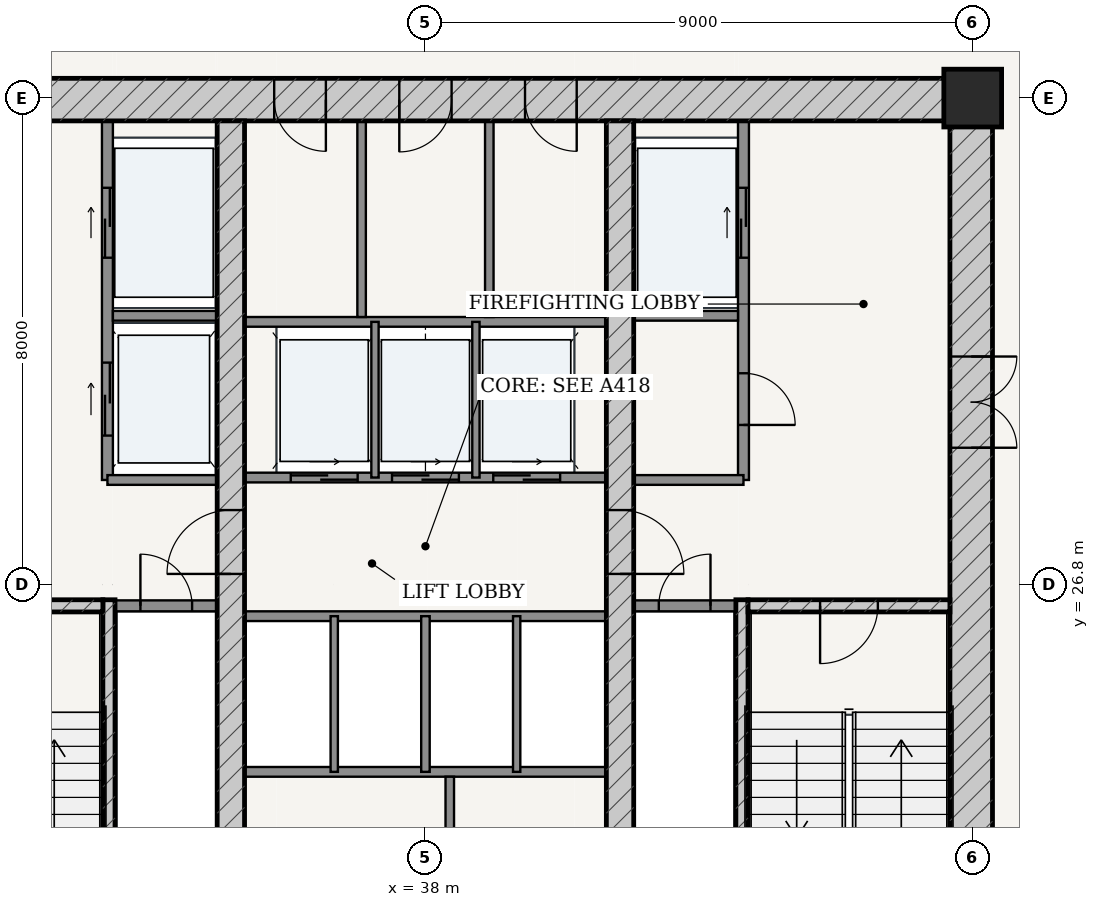
"""IFC4 building model, lengths in metres.
Left out: names, types, materials, properties, quantities, classifications, styles, units other than length and angle.
Written with IfcOpenShell. Run it as: python <this file> out.ifc"""

import sys

from ifc_helpers import new_model, si_unit, direction, frame, frame_2d, origin, origin_2d, place, context, subcontext, project, spatial, rectangle, extrude, source, transform, mapped, element, fill, save


model = new_model("IFC4")
c1 = context("Model", 3, precision=1e-05, world=origin(), true_north=direction((-0.2419218956, 0.970295726276)))
c2 = subcontext(c1, "Body", "Model", "MODEL_VIEW")
j1 = project(units=[si_unit("LENGTHUNIT", "METRE"), si_unit("PLANEANGLEUNIT", "RADIAN")], contexts=[c1])
p1 = place(None, origin())
s1 = spatial("IfcSite", under=j1, at=p1, CompositionType="ELEMENT")
p2 = place(p1, origin())
s2 = spatial("IfcBuilding", under=s1, at=p2, CompositionType="ELEMENT")
p3 = place(p2, frame((0.0, 0.0, 119.4)))
s3 = spatial("IfcBuildingStorey", under=s2, at=p3, CompositionType="ELEMENT", Elevation=119.4)
p4 = place(p3, frame((47.0, 34.8, 0.0), z_axis=(0.0, 0.0, 1.0), x_axis=(1.0, 0.0, 0.0)))
e1 = element("IfcColumn", 1, at=p4, inside=s3, PredefinedType="COLUMN", context=c2, shape_type="SweptSolid", body=[
    extrude(rectangle(XDim=0.95, YDim=0.95, at=origin_2d()), origin(), (0.0, 0.0, 1.0), 3.6),
])
p5 = place(p3, frame((28.675, 34.775, 0.0), z_axis=(0.0, 0.0, 1.0), x_axis=(1.0, 0.0, 0.0)))
e2 = element("IfcWall", 2, at=p5, inside=s3, PredefinedType="SHEAR", context=c2, shape_type="SweptSolid", body=[
    extrude(rectangle(XDim=18.65, YDim=0.7, at=frame_2d((9.325, 0.0))), origin(), (0.0, 0.0, 1.0), 3.325),
])
p6 = place(p5, frame((6.837, 0.0, 0.0)))
e3 = element("IfcOpeningElement", 3, at=p6, cuts=e2, PredefinedType="OPENING", context=c2, shape_type="SweptSolid", body=[
    extrude(rectangle(XDim=0.85, YDim=2.1, at=frame_2d((0.425, 1.05))), frame((0.0, 0.36, 0.0), z_axis=(0.0, -1.0, 0.0), x_axis=(1.0, 0.0, 0.0)), (0.0, 0.0, 1.0), 0.72),
])
p7 = place(p5, frame((8.895, 0.0, 0.0)))
e4 = element("IfcOpeningElement", 4, at=p7, cuts=e2, PredefinedType="OPENING", context=c2, shape_type="SweptSolid", body=[
    extrude(rectangle(XDim=0.86, YDim=2.1, at=frame_2d((0.43, 1.05))), frame((0.0, 0.36, 0.0), z_axis=(0.0, -1.0, 0.0), x_axis=(1.0, 0.0, 0.0)), (0.0, 0.0, 1.0), 0.72),
])
p8 = place(p5, frame((10.962, 0.0, 0.0)))
e5 = element("IfcOpeningElement", 5, at=p8, cuts=e2, PredefinedType="OPENING", context=c2, shape_type="SweptSolid", body=[
    extrude(rectangle(XDim=0.85, YDim=2.1, at=frame_2d((0.425, 1.05))), frame((0.0, 0.36, 0.0), z_axis=(0.0, -1.0, 0.0), x_axis=(1.0, 0.0, 0.0)), (0.0, 0.0, 1.0), 0.72),
])
p9 = place(p3, frame((46.975, 19.175, 0.0), z_axis=(0.0, 0.0, 1.0), x_axis=(0.0, 1.0, 0.0)))
e6 = element("IfcWall", 6, at=p9, inside=s3, PredefinedType="SHEAR", context=c2, shape_type="SweptSolid", body=[
    extrude(rectangle(XDim=15.25, YDim=0.7, at=frame_2d((7.625, 0.0))), origin(), (0.0, 0.0, 1.0), 3.325),
])
p10 = place(p9, frame((9.875, 0.0, 0.0)))
e7 = element("IfcOpeningElement", 7, at=p10, cuts=e6, PredefinedType="OPENING", context=c2, shape_type="SweptSolid", body=[
    extrude(rectangle(XDim=1.5, YDim=2.2, at=frame_2d((0.75, 1.1))), frame((0.0, 0.36, 0.0), z_axis=(0.0, -1.0, 0.0), x_axis=(1.0, 0.0, 0.0)), (0.0, 0.0, 1.0), 0.72),
])
p11 = place(p3, frame((32.795, 19.175, 0.0), z_axis=(0.0, 0.0, 1.0), x_axis=(0.0, 1.0, 0.0)))
e8 = element("IfcWall", 8, at=p11, inside=s3, PredefinedType="SOLIDWALL", context=c2, shape_type="SweptSolid", body=[
    extrude(rectangle(XDim=7.375, YDim=0.2, at=frame_2d((3.688, 0.0))), origin(), (0.0, 0.0, 1.0), 3.325),
])
p12 = place(p3, frame((29.375, 26.45, 0.0), z_axis=(0.0, 0.0, 1.0), x_axis=(1.0, 0.0, 0.0)))
e9 = element("IfcWall", 9, at=p12, inside=s3, PredefinedType="SOLIDWALL", context=c2, shape_type="SweptSolid", body=[
    extrude(rectangle(XDim=3.32, YDim=0.2, at=frame_2d((1.66, 0.0))), origin(), (0.0, 0.0, 1.0), 3.325),
])
p13 = place(p12, frame((1.185, 0.0, 0.0)))
e10 = element("IfcOpeningElement", 10, at=p13, cuts=e9, PredefinedType="OPENING", context=c2, shape_type="SweptSolid", body=[
    extrude(rectangle(XDim=0.95, YDim=2.15, at=frame_2d((0.475, 1.075))), frame((0.0, 0.11, 0.0), z_axis=(0.0, -1.0, 0.0), x_axis=(1.0, 0.0, 0.0)), (0.0, 0.0, 1.0), 0.22),
])
p14 = place(p3, frame((43.205, 19.175, 0.0), z_axis=(0.0, 0.0, 1.0), x_axis=(0.0, 1.0, 0.0)))
e11 = element("IfcWall", 11, at=p14, inside=s3, PredefinedType="SOLIDWALL", context=c2, shape_type="SweptSolid", body=[
    extrude(rectangle(XDim=7.375, YDim=0.2, at=frame_2d((3.688, 0.0))), origin(), (0.0, 0.0, 1.0), 3.325),
])
p15 = place(p3, frame((43.305, 26.45, 0.0), z_axis=(0.0, 0.0, 1.0), x_axis=(1.0, 0.0, 0.0)))
e12 = element("IfcWall", 12, at=p15, inside=s3, PredefinedType="SOLIDWALL", context=c2, shape_type="SweptSolid", body=[
    extrude(rectangle(XDim=3.32, YDim=0.2, at=frame_2d((1.66, 0.0))), origin(), (0.0, 0.0, 1.0), 3.325),
])
p16 = place(p15, frame((1.185, 0.0, 0.0)))
e13 = element("IfcOpeningElement", 13, at=p16, cuts=e12, PredefinedType="OPENING", context=c2, shape_type="SweptSolid", body=[
    extrude(rectangle(XDim=0.95, YDim=2.15, at=frame_2d((0.475, 1.075))), frame((0.0, 0.11, 0.0), z_axis=(0.0, -1.0, 0.0), x_axis=(1.0, 0.0, 0.0)), (0.0, 0.0, 1.0), 0.22),
])
p17 = place(p3, frame((34.8, 19.175, 0.0), z_axis=(0.0, 0.0, 1.0), x_axis=(0.0, 1.0, 0.0)))
e14 = element("IfcWall", 14, at=p17, inside=s3, PredefinedType="SHEAR", context=c2, shape_type="SweptSolid", body=[
    extrude(rectangle(XDim=15.25, YDim=0.45, at=frame_2d((7.625, 0.0))), origin(), (0.0, 0.0, 1.0), 3.325),
])
p18 = place(p17, frame((7.8, 0.0, 0.0)))
e15 = element("IfcOpeningElement", 15, at=p18, cuts=e14, PredefinedType="OPENING", context=c2, shape_type="SweptSolid", body=[
    extrude(rectangle(XDim=1.05, YDim=2.15, at=frame_2d((0.525, 1.075))), frame((0.0, 0.235, 0.0), z_axis=(0.0, -1.0, 0.0), x_axis=(1.0, 0.0, 0.0)), (0.0, 0.0, 1.0), 0.47),
])
p19 = place(p3, frame((41.2, 19.175, 0.0), z_axis=(0.0, 0.0, 1.0), x_axis=(0.0, 1.0, 0.0)))
e16 = element("IfcWall", 16, at=p19, inside=s3, PredefinedType="SHEAR", context=c2, shape_type="SweptSolid", body=[
    extrude(rectangle(XDim=15.25, YDim=0.45, at=frame_2d((7.625, 0.0))), origin(), (0.0, 0.0, 1.0), 3.325),
])
p20 = place(p19, frame((7.8, 0.0, 0.0)))
e17 = element("IfcOpeningElement", 17, at=p20, cuts=e16, PredefinedType="OPENING", context=c2, shape_type="SweptSolid", body=[
    extrude(rectangle(XDim=1.05, YDim=2.15, at=frame_2d((0.525, 1.075))), frame((0.0, 0.235, 0.0), z_axis=(0.0, -1.0, 0.0), x_axis=(1.0, 0.0, 0.0)), (0.0, 0.0, 1.0), 0.47),
])
p21 = place(p3, frame((32.9, 26.45, 0.0), z_axis=(0.0, 0.0, 1.0), x_axis=(1.0, 0.0, 0.0)))
e18 = element("IfcWall", 18, at=p21, inside=s3, PredefinedType="PARTITIONING", context=c2, shape_type="SweptSolid", body=[
    extrude(rectangle(XDim=1.675, YDim=0.18, at=frame_2d((0.837, 0.0))), origin(), (0.0, 0.0, 1.0), 3.325),
])
p22 = place(p21, frame((0.413, 0.0, 0.0)))
e19 = element("IfcOpeningElement", 19, at=p22, cuts=e18, PredefinedType="OPENING", context=c2, shape_type="SweptSolid", body=[
    extrude(rectangle(XDim=0.85, YDim=2.1, at=frame_2d((0.425, 1.05))), frame((0.0, 0.1, 0.0), z_axis=(0.0, -1.0, 0.0), x_axis=(1.0, 0.0, 0.0)), (0.0, 0.0, 1.0), 0.2),
])
p23 = place(p3, frame((41.425, 26.45, 0.0), z_axis=(0.0, 0.0, 1.0), x_axis=(1.0, 0.0, 0.0)))
e20 = element("IfcWall", 20, at=p23, inside=s3, PredefinedType="PARTITIONING", context=c2, shape_type="SweptSolid", body=[
    extrude(rectangle(XDim=1.675, YDim=0.18, at=frame_2d((0.837, 0.0))), origin(), (0.0, 0.0, 1.0), 3.325),
])
p24 = place(p23, frame((0.413, 0.0, 0.0)))
e21 = element("IfcOpeningElement", 21, at=p24, cuts=e20, PredefinedType="OPENING", context=c2, shape_type="SweptSolid", body=[
    extrude(rectangle(XDim=0.85, YDim=2.1, at=frame_2d((0.425, 1.05))), frame((0.0, 0.1, 0.0), z_axis=(0.0, -1.0, 0.0), x_axis=(1.0, 0.0, 0.0)), (0.0, 0.0, 1.0), 0.2),
])
p25 = place(p3, frame((32.77, 28.52, 0.0), z_axis=(0.0, 0.0, 1.0), x_axis=(0.0, 1.0, 0.0)))
e22 = element("IfcWall", 22, at=p25, inside=s3, PredefinedType="PARTITIONING", context=c2, shape_type="SweptSolid", body=[
    extrude(rectangle(XDim=5.905, YDim=0.18, at=frame_2d((2.953, 0.0))), origin(), (0.0, 0.0, 1.0), 3.325),
])
p26 = place(p25, frame((3.655, 0.0, 0.0)))
e23 = element("IfcOpeningElement", 23, at=p26, cuts=e22, PredefinedType="OPENING", context=c2, shape_type="SweptSolid", body=[
    extrude(rectangle(XDim=1.15, YDim=2.2, at=frame_2d((0.575, 1.1))), frame((0.0, 0.1, 0.0), z_axis=(0.0, -1.0, 0.0), x_axis=(1.0, 0.0, 0.0)), (0.0, 0.0, 1.0), 0.2),
])
p27 = place(p25, frame((0.73, 0.0, 0.0)))
e24 = element("IfcOpeningElement", 24, at=p27, cuts=e22, PredefinedType="OPENING", context=c2, shape_type="SweptSolid", body=[
    extrude(rectangle(XDim=1.2, YDim=2.25, at=frame_2d((0.6, 1.125))), frame((0.0, 0.1, 0.0), z_axis=(0.0, -1.0, 0.0), x_axis=(1.0, 0.0, 0.0)), (0.0, 0.0, 1.0), 0.2),
])
p28 = place(p3, frame((32.86, 31.22, 0.0), z_axis=(0.0, 0.0, 1.0), x_axis=(1.0, 0.0, 0.0)))
e25 = element("IfcWall", 25, at=p28, inside=s3, PredefinedType="PARTITIONING", context=c2, shape_type="SweptSolid", body=[
    extrude(rectangle(XDim=1.715, YDim=0.16, at=frame_2d((0.857, 0.0))), origin(), (0.0, 0.0, 1.0), 3.325),
])
p29 = place(p3, frame((32.77, 28.52, 0.0), z_axis=(0.0, 0.0, 1.0), x_axis=(1.0, 0.0, 0.0)))
e26 = element("IfcWall", 26, at=p29, inside=s3, PredefinedType="PARTITIONING", context=c2, shape_type="SweptSolid", body=[
    extrude(rectangle(XDim=1.805, YDim=0.16, at=frame_2d((0.902, 0.0))), origin(), (0.0, 0.0, 1.0), 3.325),
])
p30 = place(p3, frame((43.23, 28.52, 0.0), z_axis=(0.0, 0.0, 1.0), x_axis=(0.0, 1.0, 0.0)))
e27 = element("IfcWall", 27, at=p30, inside=s3, PredefinedType="PARTITIONING", context=c2, shape_type="SweptSolid", body=[
    extrude(rectangle(XDim=5.905, YDim=0.18, at=frame_2d((2.953, 0.0))), origin(), (0.0, 0.0, 1.0), 3.325),
])
p31 = place(p30, frame((0.905, 0.0, 0.0)))
e28 = element("IfcOpeningElement", 28, at=p31, cuts=e27, PredefinedType="OPENING", context=c2, shape_type="SweptSolid", body=[
    extrude(rectangle(XDim=0.85, YDim=2.1, at=frame_2d((0.425, 1.05))), frame((0.0, 0.1, 0.0), z_axis=(0.0, -1.0, 0.0), x_axis=(1.0, 0.0, 0.0)), (0.0, 0.0, 1.0), 0.2),
])
p32 = place(p30, frame((3.655, 0.0, 0.0)))
e29 = element("IfcOpeningElement", 29, at=p32, cuts=e27, PredefinedType="OPENING", context=c2, shape_type="SweptSolid", body=[
    extrude(rectangle(XDim=1.15, YDim=2.2, at=frame_2d((0.575, 1.1))), frame((0.0, 0.1, 0.0), z_axis=(0.0, -1.0, 0.0), x_axis=(1.0, 0.0, 0.0)), (0.0, 0.0, 1.0), 0.2),
])
p33 = place(p3, frame((41.425, 31.22, 0.0), z_axis=(0.0, 0.0, 1.0), x_axis=(1.0, 0.0, 0.0)))
e30 = element("IfcWall", 30, at=p33, inside=s3, PredefinedType="PARTITIONING", context=c2, shape_type="SweptSolid", body=[
    extrude(rectangle(XDim=1.715, YDim=0.16, at=frame_2d((0.857, 0.0))), origin(), (0.0, 0.0, 1.0), 3.325),
])
p34 = place(p3, frame((41.425, 28.52, 0.0), z_axis=(0.0, 0.0, 1.0), x_axis=(1.0, 0.0, 0.0)))
e31 = element("IfcWall", 31, at=p34, inside=s3, PredefinedType="PARTITIONING", context=c2, shape_type="SweptSolid", body=[
    extrude(rectangle(XDim=1.805, YDim=0.16, at=frame_2d((0.902, 0.0))), origin(), (0.0, 0.0, 1.0), 3.325),
])
p35 = place(p3, frame((35.025, 28.56, 0.0), z_axis=(0.0, 0.0, 1.0), x_axis=(1.0, 0.0, 0.0)))
e32 = element("IfcWall", 32, at=p35, inside=s3, PredefinedType="PARTITIONING", context=c2, shape_type="SweptSolid", body=[
    extrude(rectangle(XDim=5.95, YDim=0.16, at=frame_2d((2.975, 0.0))), origin(), (0.0, 0.0, 1.0), 3.325),
])
p36 = place(p35, frame((0.76, 0.0, 0.0)))
e33 = element("IfcOpeningElement", 33, at=p36, cuts=e32, PredefinedType="OPENING", context=c2, shape_type="SweptSolid", body=[
    extrude(rectangle(XDim=1.1, YDim=2.2, at=frame_2d((0.55, 1.1))), frame((0.0, 0.09, 0.0), z_axis=(0.0, -1.0, 0.0), x_axis=(1.0, 0.0, 0.0)), (0.0, 0.0, 1.0), 0.18),
])
p37 = place(p35, frame((2.425, 0.0, 0.0)))
e34 = element("IfcOpeningElement", 34, at=p37, cuts=e32, PredefinedType="OPENING", context=c2, shape_type="SweptSolid", body=[
    extrude(rectangle(XDim=1.1, YDim=2.2, at=frame_2d((0.55, 1.1))), frame((0.0, 0.09, 0.0), z_axis=(0.0, -1.0, 0.0), x_axis=(1.0, 0.0, 0.0)), (0.0, 0.0, 1.0), 0.18),
])
p38 = place(p35, frame((4.09, 0.0, 0.0)))
e35 = element("IfcOpeningElement", 35, at=p38, cuts=e32, PredefinedType="OPENING", context=c2, shape_type="SweptSolid", body=[
    extrude(rectangle(XDim=1.1, YDim=2.2, at=frame_2d((0.55, 1.1))), frame((0.0, 0.09, 0.0), z_axis=(0.0, -1.0, 0.0), x_axis=(1.0, 0.0, 0.0)), (0.0, 0.0, 1.0), 0.18),
])
p39 = place(p3, frame((35.025, 31.12, 0.0), z_axis=(0.0, 0.0, 1.0), x_axis=(1.0, 0.0, 0.0)))
e36 = element("IfcWall", 36, at=p39, inside=s3, PredefinedType="PARTITIONING", context=c2, shape_type="SweptSolid", body=[
    extrude(rectangle(XDim=5.95, YDim=0.16, at=frame_2d((2.975, 0.0))), origin(), (0.0, 0.0, 1.0), 3.325),
])
for number, where, z_axis, x_axis in (
    (37, (37.17, 28.56, 0.0), (0.0, 0.0, 1.0), (0.0, 1.0, 0.0)),
    (38, (38.83, 28.56, 0.0), (0.0, 0.0, 1.0), (0.0, 1.0, 0.0)),
):
    element("IfcWall", number, at=place(p3, frame(where, z_axis=z_axis, x_axis=x_axis)), inside=s3, PredefinedType="PARTITIONING", context=c2, shape_type="SweptSolid", body=[
        extrude(rectangle(XDim=2.56, YDim=0.12, at=frame_2d((1.28, 0.0))), origin(), (0.0, 0.0, 1.0), 3.325),
    ])
for number, where, z_axis, x_axis in (
    (39, (36.95, 31.2, 0.0), (0.0, 0.0, 1.0), (0.0, 1.0, 0.0)),
    (40, (39.05, 31.2, 0.0), (0.0, 0.0, 1.0), (0.0, 1.0, 0.0)),
):
    element("IfcWall", number, at=place(p3, frame(where, z_axis=z_axis, x_axis=x_axis)), inside=s3, PredefinedType="PARTITIONING", context=c2, shape_type="SweptSolid", body=[
        extrude(rectangle(XDim=3.225, YDim=0.14, at=frame_2d((1.613, 0.0))), origin(), (0.0, 0.0, 1.0), 3.325),
    ])
for number, where, z_axis, x_axis in (
    (41, (35.025, 26.28, 0.0), (0.0, 0.0, 1.0), (1.0, 0.0, 0.0)),
    (42, (35.025, 23.72, 0.0), (0.0, 0.0, 1.0), (1.0, 0.0, 0.0)),
):
    element("IfcWall", number, at=place(p3, frame(where, z_axis=z_axis, x_axis=x_axis)), inside=s3, PredefinedType="PARTITIONING", context=c2, shape_type="SweptSolid", body=[
        extrude(rectangle(XDim=5.95, YDim=0.16, at=frame_2d((2.975, 0.0))), origin(), (0.0, 0.0, 1.0), 3.325),
    ])
p40 = place(p3, frame((36.5, 23.72, 0.0), z_axis=(0.0, 0.0, 1.0), x_axis=(0.0, 1.0, 0.0)))
e43 = element("IfcWall", 43, at=p40, inside=s3, PredefinedType="PARTITIONING", context=c2, shape_type="SweptSolid", body=[
    extrude(rectangle(XDim=2.56, YDim=0.12, at=frame_2d((1.28, 0.0))), origin(), (0.0, 0.0, 1.0), 3.325),
])
p41 = place(p3, frame((38.0, 23.72, 0.0), z_axis=(0.0, 0.0, 1.0), x_axis=(0.0, 1.0, 0.0)))
e44 = element("IfcWall", 44, at=p41, inside=s3, PredefinedType="PARTITIONING", context=c2, shape_type="SweptSolid", body=[
    extrude(rectangle(XDim=2.56, YDim=0.14, at=frame_2d((1.28, 0.0))), origin(), (0.0, 0.0, 1.0), 3.325),
])
p42 = place(p3, frame((39.5, 23.72, 0.0), z_axis=(0.0, 0.0, 1.0), x_axis=(0.0, 1.0, 0.0)))
e45 = element("IfcWall", 45, at=p42, inside=s3, PredefinedType="PARTITIONING", context=c2, shape_type="SweptSolid", body=[
    extrude(rectangle(XDim=2.56, YDim=0.12, at=frame_2d((1.28, 0.0))), origin(), (0.0, 0.0, 1.0), 3.325),
])
p43 = place(p3, frame((38.4, 19.175, 0.0), z_axis=(0.0, 0.0, 1.0), x_axis=(0.0, 1.0, 0.0)))
e46 = element("IfcWall", 46, at=p43, inside=s3, PredefinedType="PARTITIONING", context=c2, shape_type="SweptSolid", body=[
    extrude(rectangle(XDim=4.465, YDim=0.14, at=frame_2d((2.232, 0.0))), origin(), (0.0, 0.0, 1.0), 3.325),
])
m1 = source(origin(), c2, "Body", "SweptSolid", [
    extrude(rectangle(XDim=1.5, YDim=2.2, at=frame_2d((0.75, 1.1))), frame((0.0, 0.025, 0.0), z_axis=(0.0, -1.0, 0.0), x_axis=(1.0, 0.0, 0.0)), (0.0, 0.0, 1.0), 0.05),
])
p44 = place(p10, frame((1.5, 0.0, 0.0), z_axis=(0.0, 0.0, 1.0), x_axis=(-1.0, 0.0, 0.0)))
e47 = element("IfcDoor", 47, at=p44, inside=s3, OperationType="DOUBLE_DOOR_SINGLE_SWING", PredefinedType="DOOR", context=c2, shape_type="MappedRepresentation", body=[
    mapped(m1, transform((0.0, 0.0, 0.0), scale=1.0)),
])
fill(e7, e47)
m2 = source(origin(), c2, "Body", "SweptSolid", [
    extrude(rectangle(XDim=1.05, YDim=2.15, at=frame_2d((0.525, 1.075))), frame((0.0, 0.025, 0.0), z_axis=(0.0, -1.0, 0.0), x_axis=(1.0, 0.0, 0.0)), (0.0, 0.0, 1.0), 0.05),
])
p45 = place(p18, origin())
e48 = element("IfcDoor", 48, at=p45, inside=s3, OperationType="SINGLE_SWING_LEFT", PredefinedType="DOOR", context=c2, shape_type="MappedRepresentation", body=[
    mapped(m2, transform((0.0, 0.0, 0.0), scale=1.0)),
])
fill(e15, e48)
p46 = place(p20, frame((1.05, 0.0, 0.0), z_axis=(0.0, 0.0, 1.0), x_axis=(-1.0, 0.0, 0.0)))
e49 = element("IfcDoor", 49, at=p46, inside=s3, OperationType="SINGLE_SWING_RIGHT", PredefinedType="DOOR", context=c2, shape_type="MappedRepresentation", body=[
    mapped(m2, transform((0.0, 0.0, 0.0), scale=1.0)),
])
fill(e17, e49)
m3 = source(origin(), c2, "Body", "SweptSolid", [
    extrude(rectangle(XDim=0.95, YDim=2.15, at=frame_2d((0.475, 1.075))), frame((0.0, 0.025, 0.0), z_axis=(0.0, -1.0, 0.0), x_axis=(1.0, 0.0, 0.0)), (0.0, 0.0, 1.0), 0.05),
])
p47 = place(p16, frame((0.95, 0.0, 0.0), z_axis=(0.0, 0.0, 1.0), x_axis=(-1.0, 0.0, 0.0)))
e50 = element("IfcDoor", 50, at=p47, inside=s3, OperationType="SINGLE_SWING_RIGHT", PredefinedType="DOOR", context=c2, shape_type="MappedRepresentation", body=[
    mapped(m3, transform((0.0, 0.0, 0.0), scale=1.0)),
])
fill(e13, e50)
m4 = source(origin(), c2, "Body", "SweptSolid", [
    extrude(rectangle(XDim=0.85, YDim=2.1, at=frame_2d((0.425, 1.05))), frame((0.0, 0.025, 0.0), z_axis=(0.0, -1.0, 0.0), x_axis=(1.0, 0.0, 0.0)), (0.0, 0.0, 1.0), 0.05),
])
p48 = place(p22, origin())
e51 = element("IfcDoor", 51, at=p48, inside=s3, OperationType="SINGLE_SWING_LEFT", PredefinedType="DOOR", context=c2, shape_type="MappedRepresentation", body=[
    mapped(m4, transform((0.0, 0.0, 0.0), scale=1.0)),
])
fill(e19, e51)
p49 = place(p24, origin())
e52 = element("IfcDoor", 52, at=p49, inside=s3, OperationType="SINGLE_SWING_RIGHT", PredefinedType="DOOR", context=c2, shape_type="MappedRepresentation", body=[
    mapped(m4, transform((0.0, 0.0, 0.0), scale=1.0)),
])
fill(e21, e52)
p50 = place(p31, frame((0.85, 0.0, 0.0), z_axis=(0.0, 0.0, 1.0), x_axis=(-1.0, 0.0, 0.0)))
e53 = element("IfcDoor", 53, at=p50, inside=s3, OperationType="SINGLE_SWING_RIGHT", PredefinedType="DOOR", context=c2, shape_type="MappedRepresentation", body=[
    mapped(m4, transform((0.0, 0.0, 0.0), scale=1.0)),
])
fill(e28, e53)
p51 = place(p6, frame((0.85, 0.0, 0.0), z_axis=(0.0, 0.0, 1.0), x_axis=(-1.0, 0.0, 0.0)))
e54 = element("IfcDoor", 54, at=p51, inside=s3, OperationType="SINGLE_SWING_LEFT", PredefinedType="DOOR", context=c2, shape_type="MappedRepresentation", body=[
    mapped(m4, transform((0.0, 0.0, 0.0), scale=1.0)),
])
fill(e3, e54)
m5 = source(origin(), c2, "Body", "SweptSolid", [
    extrude(rectangle(XDim=0.86, YDim=2.1, at=frame_2d((0.43, 1.05))), frame((0.0, 0.025, 0.0), z_axis=(0.0, -1.0, 0.0), x_axis=(1.0, 0.0, 0.0)), (0.0, 0.0, 1.0), 0.05),
])
p52 = place(p7, frame((0.86, 0.0, 0.0), z_axis=(0.0, 0.0, 1.0), x_axis=(-1.0, 0.0, 0.0)))
e55 = element("IfcDoor", 55, at=p52, inside=s3, OperationType="SINGLE_SWING_RIGHT", PredefinedType="DOOR", context=c2, shape_type="MappedRepresentation", body=[
    mapped(m5, transform((0.0, 0.0, 0.0), scale=1.0)),
])
fill(e4, e55)
p53 = place(p8, frame((0.85, 0.0, 0.0), z_axis=(0.0, 0.0, 1.0), x_axis=(-1.0, 0.0, 0.0)))
e56 = element("IfcDoor", 56, at=p53, inside=s3, OperationType="SINGLE_SWING_LEFT", PredefinedType="DOOR", context=c2, shape_type="MappedRepresentation", body=[
    mapped(m4, transform((0.0, 0.0, 0.0), scale=1.0)),
])
fill(e5, e56)
m6 = source(origin(), c2, "Body", "SweptSolid", [
    extrude(rectangle(XDim=1.15, YDim=2.2, at=frame_2d((0.575, 1.1))), frame((0.0, 0.025, 0.0), z_axis=(0.0, -1.0, 0.0), x_axis=(1.0, 0.0, 0.0)), (0.0, 0.0, 1.0), 0.05),
])
p54 = place(p26, origin())
e57 = element("IfcDoor", 57, at=p54, inside=s3, OperationType="DOUBLE_DOOR_SLIDING", PredefinedType="DOOR", context=c2, shape_type="MappedRepresentation", body=[
    mapped(m6, transform((0.0, 0.0, 0.0), scale=1.0)),
])
fill(e23, e57)
p55 = place(p32, origin())
e58 = element("IfcDoor", 58, at=p55, inside=s3, OperationType="DOUBLE_DOOR_SLIDING", PredefinedType="DOOR", context=c2, shape_type="MappedRepresentation", body=[
    mapped(m6, transform((0.0, 0.0, 0.0), scale=1.0)),
])
fill(e29, e58)
m7 = source(origin(), c2, "Body", "SweptSolid", [
    extrude(rectangle(XDim=1.2, YDim=2.25, at=frame_2d((0.6, 1.125))), frame((0.0, 0.025, 0.0), z_axis=(0.0, -1.0, 0.0), x_axis=(1.0, 0.0, 0.0)), (0.0, 0.0, 1.0), 0.05),
])
p56 = place(p27, origin())
e59 = element("IfcDoor", 59, at=p56, inside=s3, OperationType="DOUBLE_DOOR_SLIDING", PredefinedType="DOOR", context=c2, shape_type="MappedRepresentation", body=[
    mapped(m7, transform((0.0, 0.0, 0.0), scale=1.0)),
])
fill(e24, e59)
m8 = source(origin(), c2, "Body", "SweptSolid", [
    extrude(rectangle(XDim=1.1, YDim=2.2, at=frame_2d((0.55, 1.1))), frame((0.0, 0.025, 0.0), z_axis=(0.0, -1.0, 0.0), x_axis=(1.0, 0.0, 0.0)), (0.0, 0.0, 1.0), 0.05),
])
p57 = place(p36, origin())
e60 = element("IfcDoor", 60, at=p57, inside=s3, OperationType="DOUBLE_DOOR_SLIDING", PredefinedType="DOOR", context=c2, shape_type="MappedRepresentation", body=[
    mapped(m8, transform((0.0, 0.0, 0.0), scale=1.0)),
])
fill(e33, e60)
p58 = place(p37, origin())
e61 = element("IfcDoor", 61, at=p58, inside=s3, OperationType="DOUBLE_DOOR_SLIDING", PredefinedType="DOOR", context=c2, shape_type="MappedRepresentation", body=[
    mapped(m8, transform((0.0, 0.0, 0.0), scale=1.0)),
])
fill(e34, e61)
p59 = place(p38, origin())
e62 = element("IfcDoor", 62, at=p59, inside=s3, OperationType="DOUBLE_DOOR_SLIDING", PredefinedType="DOOR", context=c2, shape_type="MappedRepresentation", body=[
    mapped(m8, transform((0.0, 0.0, 0.0), scale=1.0)),
])
fill(e35, e62)
save(model, sys.argv[1])
